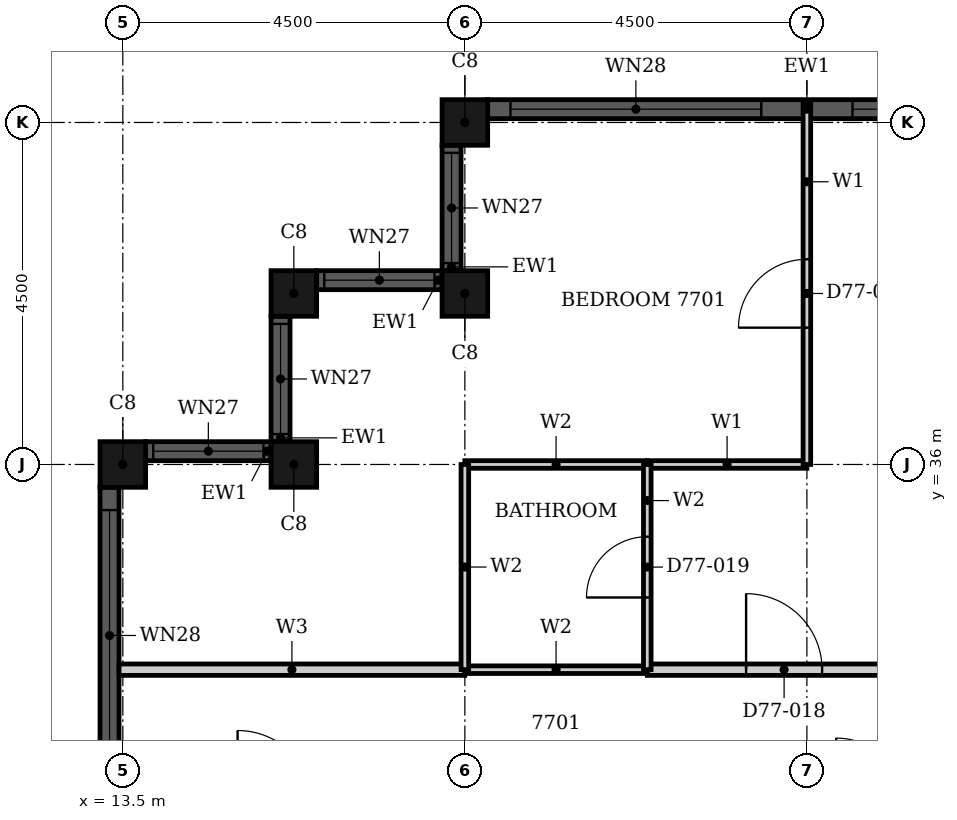
"""IFC4 building model, lengths in metres.
Left out: names, types, materials, properties, quantities, classifications, styles, units other than length and angle.
Written with IfcOpenShell. Run it as: python <this file> out.ifc"""

import sys

from ifc_helpers import new_model, si_unit, direction, frame, frame_2d, origin, origin_2d, place, context, subcontext, project, spatial, rectangle, hollow_rectangle, extrude, element, fill, save


model = new_model("IFC4")
c1 = context("Model", 3, precision=1e-05, world=origin(), true_north=direction((0.0, 1.0)))
c2 = subcontext(c1, "Body", "Model", "MODEL_VIEW")
j1 = project(units=[si_unit("LENGTHUNIT", "METRE"), si_unit("PLANEANGLEUNIT", "RADIAN")], contexts=[c1])
p1 = place(None, origin())
s1 = spatial("IfcSite", under=j1, at=p1, CompositionType="ELEMENT")
p2 = place(p1, origin())
s2 = spatial("IfcBuilding", under=s1, at=p2, CompositionType="ELEMENT")
p3 = place(p2, frame((0.0, 0.0, 301.9)))
s3 = spatial("IfcBuildingStorey", under=s2, at=p3, CompositionType="ELEMENT", Elevation=301.9)
for number, where, z_axis, x_axis in (
    (1, (18.0, 40.5, 0.0), (0.0, 0.0, 1.0), (1.0, 0.0, 0.0)),
    (2, (18.0, 38.25, 0.0), (0.0, 0.0, 1.0), (1.0, 0.0, 0.0)),
    (3, (15.75, 38.25, 0.0), (0.0, 0.0, 1.0), (1.0, 0.0, 0.0)),
    (4, (15.75, 36.0, 0.0), (0.0, 0.0, 1.0), (1.0, 0.0, 0.0)),
    (5, (13.5, 36.0, 0.0), (0.0, 0.0, 1.0), (1.0, 0.0, 0.0)),
):
    element("IfcColumn", number, at=place(p3, frame(where, z_axis=z_axis, x_axis=x_axis)), inside=s3, PredefinedType="COLUMN", context=c2, shape_type="SweptSolid", body=[
        extrude(hollow_rectangle(XDim=0.6, YDim=0.6, WallThickness=0.02, at=origin_2d()), origin(), (0.0, 0.0, 1.0), 3.7),
    ])
p4 = place(p3, frame((26.7, 40.675, 0.0), z_axis=(0.0, 0.0, 1.0), x_axis=(-1.0, 0.0, 0.0)))
e6 = element("IfcWall", 6, at=p4, inside=s3, PredefinedType="SOLIDWALL", context=c2, shape_type="SweptSolid", body=[
    extrude(rectangle(XDim=8.4, YDim=0.25, at=frame_2d((4.2, 0.0))), origin(), (0.0, 0.0, 1.0), 3.7),
])
p5 = place(p4, frame((0.3, 0.0, 0.45)))
e7 = element("IfcOpeningElement", 7, at=p5, cuts=e6, PredefinedType="OPENING", context=c2, shape_type="SweptSolid", body=[
    extrude(rectangle(XDim=3.3, YDim=1.8, at=frame_2d((1.65, 0.9))), frame((0.0, 0.135, 0.0), z_axis=(0.0, -1.0, 0.0), x_axis=(1.0, 0.0, 0.0)), (0.0, 0.0, 1.0), 0.27),
])
p6 = place(p4, frame((4.8, 0.0, 0.45)))
e8 = element("IfcOpeningElement", 8, at=p6, cuts=e6, PredefinedType="OPENING", context=c2, shape_type="SweptSolid", body=[
    extrude(rectangle(XDim=3.3, YDim=1.8, at=frame_2d((1.65, 0.9))), frame((0.0, 0.135, 0.0), z_axis=(0.0, -1.0, 0.0), x_axis=(1.0, 0.0, 0.0)), (0.0, 0.0, 1.0), 0.27),
])
p7 = place(p3, frame((17.825, 40.2, 0.0), z_axis=(0.0, 0.0, 1.0), x_axis=(0.0, -1.0, 0.0)))
e9 = element("IfcWall", 9, at=p7, inside=s3, PredefinedType="SOLIDWALL", context=c2, shape_type="SweptSolid", body=[
    extrude(rectangle(XDim=1.65, YDim=0.25, at=frame_2d((0.825, 0.0))), origin(), (0.0, 0.0, 1.0), 3.7),
])
p8 = place(p7, frame((0.1, 0.0, 0.9)))
e10 = element("IfcOpeningElement", 10, at=p8, cuts=e9, PredefinedType="OPENING", context=c2, shape_type="SweptSolid", body=[
    extrude(rectangle(XDim=1.45, YDim=1.35, at=frame_2d((0.725, 0.675))), frame((0.0, 0.135, 0.0), z_axis=(0.0, -1.0, 0.0), x_axis=(1.0, 0.0, 0.0)), (0.0, 0.0, 1.0), 0.27),
])
p9 = place(p3, frame((17.7, 38.425, 0.0), z_axis=(0.0, 0.0, 1.0), x_axis=(-1.0, 0.0, 0.0)))
e11 = element("IfcWall", 11, at=p9, inside=s3, PredefinedType="SOLIDWALL", context=c2, shape_type="SweptSolid", body=[
    extrude(rectangle(XDim=1.65, YDim=0.25, at=frame_2d((0.825, 0.0))), origin(), (0.0, 0.0, 1.0), 3.7),
])
p10 = place(p9, frame((0.1, 0.0, 0.9)))
e12 = element("IfcOpeningElement", 12, at=p10, cuts=e11, PredefinedType="OPENING", context=c2, shape_type="SweptSolid", body=[
    extrude(rectangle(XDim=1.45, YDim=1.35, at=frame_2d((0.725, 0.675))), frame((0.0, 0.135, 0.0), z_axis=(0.0, -1.0, 0.0), x_axis=(1.0, 0.0, 0.0)), (0.0, 0.0, 1.0), 0.27),
])
p11 = place(p3, frame((15.575, 37.95, 0.0), z_axis=(0.0, 0.0, 1.0), x_axis=(0.0, -1.0, 0.0)))
e13 = element("IfcWall", 13, at=p11, inside=s3, PredefinedType="SOLIDWALL", context=c2, shape_type="SweptSolid", body=[
    extrude(rectangle(XDim=1.65, YDim=0.25, at=frame_2d((0.825, 0.0))), origin(), (0.0, 0.0, 1.0), 3.7),
])
p12 = place(p11, frame((0.1, 0.0, 0.9)))
e14 = element("IfcOpeningElement", 14, at=p12, cuts=e13, PredefinedType="OPENING", context=c2, shape_type="SweptSolid", body=[
    extrude(rectangle(XDim=1.45, YDim=1.35, at=frame_2d((0.725, 0.675))), frame((0.0, 0.135, 0.0), z_axis=(0.0, -1.0, 0.0), x_axis=(1.0, 0.0, 0.0)), (0.0, 0.0, 1.0), 0.27),
])
p13 = place(p3, frame((15.45, 36.175, 0.0), z_axis=(0.0, 0.0, 1.0), x_axis=(-1.0, 0.0, 0.0)))
e15 = element("IfcWall", 15, at=p13, inside=s3, PredefinedType="SOLIDWALL", context=c2, shape_type="SweptSolid", body=[
    extrude(rectangle(XDim=1.65, YDim=0.25, at=frame_2d((0.825, 0.0))), origin(), (0.0, 0.0, 1.0), 3.7),
])
p14 = place(p13, frame((0.1, 0.0, 0.9)))
e16 = element("IfcOpeningElement", 16, at=p14, cuts=e15, PredefinedType="OPENING", context=c2, shape_type="SweptSolid", body=[
    extrude(rectangle(XDim=1.45, YDim=1.35, at=frame_2d((0.725, 0.675))), frame((0.0, 0.135, 0.0), z_axis=(0.0, -1.0, 0.0), x_axis=(1.0, 0.0, 0.0)), (0.0, 0.0, 1.0), 0.27),
])
p15 = place(p3, frame((13.325, 35.7, 0.0), z_axis=(0.0, 0.0, 1.0), x_axis=(0.0, -1.0, 0.0)))
e17 = element("IfcWall", 17, at=p15, inside=s3, PredefinedType="SOLIDWALL", context=c2, shape_type="SweptSolid", body=[
    extrude(rectangle(XDim=8.4, YDim=0.25, at=frame_2d((4.2, 0.0))), origin(), (0.0, 0.0, 1.0), 3.7),
])
p16 = place(p15, frame((0.3, 0.0, 0.45)))
e18 = element("IfcOpeningElement", 18, at=p16, cuts=e17, PredefinedType="OPENING", context=c2, shape_type="SweptSolid", body=[
    extrude(rectangle(XDim=3.3, YDim=1.8, at=frame_2d((1.65, 0.9))), frame((0.0, 0.135, 0.0), z_axis=(0.0, -1.0, 0.0), x_axis=(1.0, 0.0, 0.0)), (0.0, 0.0, 1.0), 0.27),
])
p17 = place(p15, frame((4.8, 0.0, 0.45)))
e19 = element("IfcOpeningElement", 19, at=p17, cuts=e17, PredefinedType="OPENING", context=c2, shape_type="SweptSolid", body=[
    extrude(rectangle(XDim=3.3, YDim=1.8, at=frame_2d((1.65, 0.9))), frame((0.0, 0.135, 0.0), z_axis=(0.0, -1.0, 0.0), x_axis=(1.0, 0.0, 0.0)), (0.0, 0.0, 1.0), 0.27),
])
p18 = place(p3, frame((13.45, 33.3, 0.0), z_axis=(0.0, 0.0, 1.0), x_axis=(1.0, 0.0, 0.0)))
e20 = element("IfcWall", 20, at=p18, inside=s3, PredefinedType="PARTITIONING", context=c2, shape_type="SweptSolid", body=[
    extrude(rectangle(XDim=4.549, YDim=0.15, at=frame_2d((2.274, 0.0))), origin(), (0.0, 0.0, 1.0), 3.2),
])
p19 = place(p3, frame((20.4, 33.3, 0.0), z_axis=(0.0, 0.0, 1.0), x_axis=(1.0, 0.0, 0.0)))
e21 = element("IfcWall", 21, at=p19, inside=s3, PredefinedType="PARTITIONING", context=c2, shape_type="SweptSolid", body=[
    extrude(rectangle(XDim=13.2, YDim=0.15, at=frame_2d((6.6, 0.0))), origin(), (0.0, 0.0, 1.0), 3.2),
])
p20 = place(p19, frame((1.3, 0.0, 0.0)))
e22 = element("IfcOpeningElement", 22, at=p20, cuts=e21, PredefinedType="OPENING", context=c2, shape_type="SweptSolid", body=[
    extrude(rectangle(XDim=1.0, YDim=2.2, at=frame_2d((0.5, 1.1))), frame((0.0, 0.085, 0.0), z_axis=(0.0, -1.0, 0.0), x_axis=(1.0, 0.0, 0.0)), (0.0, 0.0, 1.0), 0.17),
])
p21 = place(p19, frame((10.9, 0.0, 0.0)))
e23 = element("IfcOpeningElement", 23, at=p21, cuts=e21, PredefinedType="OPENING", context=c2, shape_type="SweptSolid", body=[
    extrude(rectangle(XDim=1.0, YDim=2.2, at=frame_2d((0.5, 1.1))), frame((0.0, 0.085, 0.0), z_axis=(0.0, -1.0, 0.0), x_axis=(1.0, 0.0, 0.0)), (0.0, 0.0, 1.0), 0.17),
])
p22 = place(p3, frame((20.4, 36.0, 0.0), z_axis=(0.0, 0.0, 1.0), x_axis=(1.0, 0.0, 0.0)))
e24 = element("IfcWall", 24, at=p22, inside=s3, PredefinedType="PARTITIONING", context=c2, shape_type="SweptSolid", body=[
    extrude(rectangle(XDim=2.1, YDim=0.1, at=frame_2d((1.05, 0.0))), origin(), (0.0, 0.0, 1.0), 3.2),
])
p23 = place(p3, frame((22.5, 36.0, 0.0), z_axis=(0.0, 0.0, 1.0), x_axis=(0.0, 1.0, 0.0)))
e25 = element("IfcWall", 25, at=p23, inside=s3, PredefinedType="PARTITIONING", context=c2, shape_type="SweptSolid", body=[
    extrude(rectangle(XDim=4.74, YDim=0.1, at=frame_2d((2.37, 0.0))), origin(), (0.0, 0.0, 1.0), 3.2),
])
p24 = place(p23, frame((1.8, 0.0, 0.0)))
e26 = element("IfcOpeningElement", 26, at=p24, cuts=e25, PredefinedType="OPENING", context=c2, shape_type="SweptSolid", body=[
    extrude(rectangle(XDim=0.9, YDim=2.1, at=frame_2d((0.45, 1.05))), frame((0.0, 0.06, 0.0), z_axis=(0.0, -1.0, 0.0), x_axis=(1.0, 0.0, 0.0)), (0.0, 0.0, 1.0), 0.12),
])
for number, where, z_axis, x_axis in (
    (27, (18.0, 33.3, 0.0), (0.0, 0.0, 1.0), (1.0, 0.0, 0.0)),
    (28, (18.0, 36.0, 0.0), (0.0, 0.0, 1.0), (1.0, 0.0, 0.0)),
):
    element("IfcWall", number, at=place(p3, frame(where, z_axis=z_axis, x_axis=x_axis)), inside=s3, PredefinedType="PARTITIONING", context=c2, shape_type="SweptSolid", body=[
        extrude(rectangle(XDim=2.4, YDim=0.1, at=frame_2d((1.2, 0.0))), origin(), (0.0, 0.0, 1.0), 3.2),
    ])
p25 = place(p3, frame((18.0, 33.301, 0.0), z_axis=(0.0, 0.0, 1.0), x_axis=(0.0, 1.0, 0.0)))
e29 = element("IfcWall", 29, at=p25, inside=s3, PredefinedType="PARTITIONING", context=c2, shape_type="SweptSolid", body=[
    extrude(rectangle(XDim=2.699, YDim=0.1, at=frame_2d((1.35, 0.0))), origin(), (0.0, 0.0, 1.0), 3.2),
])
p26 = place(p3, frame((20.4, 33.3, 0.0), z_axis=(0.0, 0.0, 1.0), x_axis=(0.0, 1.0, 0.0)))
e30 = element("IfcWall", 30, at=p26, inside=s3, PredefinedType="PARTITIONING", context=c2, shape_type="SweptSolid", body=[
    extrude(rectangle(XDim=2.7, YDim=0.1, at=frame_2d((1.35, 0.0))), origin(), (0.0, 0.0, 1.0), 3.2),
])
p27 = place(p26, frame((0.95, 0.0, 0.0)))
e31 = element("IfcOpeningElement", 31, at=p27, cuts=e30, PredefinedType="OPENING", context=c2, shape_type="SweptSolid", body=[
    extrude(rectangle(XDim=0.8, YDim=2.1, at=frame_2d((0.4, 1.05))), frame((0.0, 0.06, 0.0), z_axis=(0.0, -1.0, 0.0), x_axis=(1.0, 0.0, 0.0)), (0.0, 0.0, 1.0), 0.12),
])
p28 = place(p5, origin())
e32 = element("IfcWindow", 32, at=p28, inside=s3, PartitioningType="SINGLE_PANEL", PredefinedType="WINDOW", context=c2, shape_type="SweptSolid", body=[
    extrude(rectangle(XDim=3.3, YDim=1.8, at=frame_2d((1.65, 0.9))), frame((0.0, 0.03, 0.0), z_axis=(0.0, -1.0, 0.0), x_axis=(1.0, 0.0, 0.0)), (0.0, 0.0, 1.0), 0.06),
])
fill(e7, e32)
p29 = place(p6, origin())
e33 = element("IfcWindow", 33, at=p29, inside=s3, PartitioningType="SINGLE_PANEL", PredefinedType="WINDOW", context=c2, shape_type="SweptSolid", body=[
    extrude(rectangle(XDim=3.3, YDim=1.8, at=frame_2d((1.65, 0.9))), frame((0.0, 0.03, 0.0), z_axis=(0.0, -1.0, 0.0), x_axis=(1.0, 0.0, 0.0)), (0.0, 0.0, 1.0), 0.06),
])
fill(e8, e33)
p30 = place(p8, origin())
e34 = element("IfcWindow", 34, at=p30, inside=s3, PartitioningType="SINGLE_PANEL", PredefinedType="WINDOW", context=c2, shape_type="SweptSolid", body=[
    extrude(rectangle(XDim=1.45, YDim=1.35, at=frame_2d((0.725, 0.675))), frame((0.0, 0.03, 0.0), z_axis=(0.0, -1.0, 0.0), x_axis=(1.0, 0.0, 0.0)), (0.0, 0.0, 1.0), 0.06),
])
fill(e10, e34)
p31 = place(p10, origin())
e35 = element("IfcWindow", 35, at=p31, inside=s3, PartitioningType="SINGLE_PANEL", PredefinedType="WINDOW", context=c2, shape_type="SweptSolid", body=[
    extrude(rectangle(XDim=1.45, YDim=1.35, at=frame_2d((0.725, 0.675))), frame((0.0, 0.03, 0.0), z_axis=(0.0, -1.0, 0.0), x_axis=(1.0, 0.0, 0.0)), (0.0, 0.0, 1.0), 0.06),
])
fill(e12, e35)
p32 = place(p12, origin())
e36 = element("IfcWindow", 36, at=p32, inside=s3, PartitioningType="SINGLE_PANEL", PredefinedType="WINDOW", context=c2, shape_type="SweptSolid", body=[
    extrude(rectangle(XDim=1.45, YDim=1.35, at=frame_2d((0.725, 0.675))), frame((0.0, 0.03, 0.0), z_axis=(0.0, -1.0, 0.0), x_axis=(1.0, 0.0, 0.0)), (0.0, 0.0, 1.0), 0.06),
])
fill(e14, e36)
p33 = place(p14, origin())
e37 = element("IfcWindow", 37, at=p33, inside=s3, PartitioningType="SINGLE_PANEL", PredefinedType="WINDOW", context=c2, shape_type="SweptSolid", body=[
    extrude(rectangle(XDim=1.45, YDim=1.35, at=frame_2d((0.725, 0.675))), frame((0.0, 0.03, 0.0), z_axis=(0.0, -1.0, 0.0), x_axis=(1.0, 0.0, 0.0)), (0.0, 0.0, 1.0), 0.06),
])
fill(e16, e37)
p34 = place(p16, origin())
e38 = element("IfcWindow", 38, at=p34, inside=s3, PartitioningType="SINGLE_PANEL", PredefinedType="WINDOW", context=c2, shape_type="SweptSolid", body=[
    extrude(rectangle(XDim=3.3, YDim=1.8, at=frame_2d((1.65, 0.9))), frame((0.0, 0.03, 0.0), z_axis=(0.0, -1.0, 0.0), x_axis=(1.0, 0.0, 0.0)), (0.0, 0.0, 1.0), 0.06),
])
fill(e18, e38)
p35 = place(p20, origin())
e39 = element("IfcDoor", 39, at=p35, inside=s3, OperationType="SINGLE_SWING_RIGHT", PredefinedType="DOOR", context=c2, shape_type="SweptSolid", body=[
    extrude(rectangle(XDim=1.0, YDim=2.2, at=frame_2d((0.5, 1.1))), frame((0.0, 0.025, 0.0), z_axis=(0.0, -1.0, 0.0), x_axis=(1.0, 0.0, 0.0)), (0.0, 0.0, 1.0), 0.05),
])
fill(e22, e39)
p36 = place(p27, origin())
e40 = element("IfcDoor", 40, at=p36, inside=s3, OperationType="SINGLE_SWING_LEFT", PredefinedType="DOOR", context=c2, shape_type="SweptSolid", body=[
    extrude(rectangle(XDim=0.8, YDim=2.1, at=frame_2d((0.4, 1.05))), frame((0.0, 0.025, 0.0), z_axis=(0.0, -1.0, 0.0), x_axis=(1.0, 0.0, 0.0)), (0.0, 0.0, 1.0), 0.05),
])
fill(e31, e40)
p37 = place(p24, origin())
e41 = element("IfcDoor", 41, at=p37, inside=s3, OperationType="SINGLE_SWING_RIGHT", PredefinedType="DOOR", context=c2, shape_type="SweptSolid", body=[
    extrude(rectangle(XDim=0.9, YDim=2.1, at=frame_2d((0.45, 1.05))), frame((0.0, 0.025, 0.0), z_axis=(0.0, -1.0, 0.0), x_axis=(1.0, 0.0, 0.0)), (0.0, 0.0, 1.0), 0.05),
])
fill(e26, e41)
save(model, sys.argv[1])
